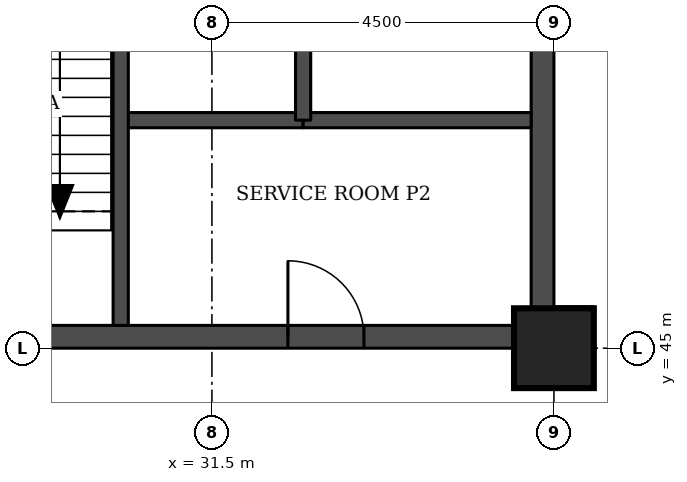
"""IFC4 building model, lengths in metres.
Left out: names, types, materials, properties, quantities, classifications, styles, units other than length and angle.
Written with IfcOpenShell. Run it as: python <this file> out.ifc"""

import sys

from ifc_helpers import new_model, si_unit, direction, frame, frame_2d, origin, origin_2d, place, context, subcontext, project, spatial, rectangle, extrude, element, fill, save


model = new_model("IFC4")
c1 = context("Model", 3, precision=1e-05, world=origin(), true_north=direction((0.0, 1.0)))
c2 = subcontext(c1, "Body", "Model", "MODEL_VIEW")
j1 = project(units=[si_unit("LENGTHUNIT", "METRE"), si_unit("PLANEANGLEUNIT", "RADIAN")], contexts=[c1])
p1 = place(None, origin())
s1 = spatial("IfcSite", under=j1, at=p1, CompositionType="ELEMENT")
p2 = place(p1, origin())
s2 = spatial("IfcBuilding", under=s1, at=p2, CompositionType="ELEMENT")
p3 = place(p2, frame((0.0, 0.0, 127.0)))
s3 = spatial("IfcBuildingStorey", under=s2, at=p3, CompositionType="ELEMENT", Elevation=127.0)
p4 = place(p3, frame((36.0, 45.0, 0.0), z_axis=(0.0, 0.0, 1.0), x_axis=(1.0, 0.0, 0.0)))
e1 = element("IfcColumn", 1, at=p4, inside=s3, PredefinedType="COLUMN", context=c2, shape_type="SweptSolid", body=[
    extrude(rectangle(XDim=1.05, YDim=1.05, at=origin_2d()), origin(), (0.0, 0.0, 1.0), 3.7),
])
p5 = place(p3, frame((27.3, 45.15, 0.0), z_axis=(0.0, 0.0, 1.0), x_axis=(1.0, 0.0, 0.0)))
e2 = element("IfcWall", 2, at=p5, inside=s3, PredefinedType="SHEAR", context=c2, shape_type="SweptSolid", body=[
    extrude(rectangle(XDim=8.4, YDim=0.3, at=frame_2d((4.2, 0.0))), origin(), (0.0, 0.0, 1.0), 3.7),
])
p6 = place(p5, frame((5.2, 0.0, 0.0)))
e3 = element("IfcOpeningElement", 3, at=p6, cuts=e2, PredefinedType="OPENING", context=c2, shape_type="SweptSolid", body=[
    extrude(rectangle(XDim=1.0, YDim=2.1, at=frame_2d((0.5, 1.05))), frame((0.0, 0.16, 0.0), z_axis=(0.0, -1.0, 0.0), x_axis=(1.0, 0.0, 0.0)), (0.0, 0.0, 1.0), 0.32),
])
p7 = place(p3, frame((35.85, 45.0, 0.0), z_axis=(0.0, 0.0, 1.0), x_axis=(0.0, 1.0, 0.0)))
e4 = element("IfcWall", 4, at=p7, inside=s3, PredefinedType="SHEAR", context=c2, shape_type="SweptSolid", body=[
    extrude(rectangle(XDim=9.0, YDim=0.3, at=frame_2d((4.5, 0.0))), origin(), (0.0, 0.0, 1.0), 3.7),
])
p8 = place(p3, frame((30.3, 48.0, 0.0), z_axis=(0.0, 0.0, 1.0), x_axis=(1.0, 0.0, 0.0)))
e5 = element("IfcWall", 5, at=p8, inside=s3, PredefinedType="SOLIDWALL", context=c2, shape_type="SweptSolid", body=[
    extrude(rectangle(XDim=2.4, YDim=0.2, at=frame_2d((1.2, 0.0))), origin(), (0.0, 0.0, 1.0), 3.55),
])
p9 = place(p3, frame((32.7, 48.0, 0.0), z_axis=(0.0, 0.0, 1.0), x_axis=(1.0, 0.0, 0.0)))
e6 = element("IfcWall", 6, at=p9, inside=s3, PredefinedType="SOLIDWALL", context=c2, shape_type="SweptSolid", body=[
    extrude(rectangle(XDim=3.0, YDim=0.2, at=frame_2d((1.5, 0.0))), origin(), (0.0, 0.0, 1.0), 3.55),
])
for number, where, z_axis, x_axis in (
    (7, (30.3, 45.3, 0.0), (0.0, 0.0, 1.0), (0.0, 1.0, 0.0)),
    (8, (32.7, 48.0, 0.0), (0.0, 0.0, 1.0), (0.0, 1.0, 0.0)),
):
    element("IfcWall", number, at=place(p3, frame(where, z_axis=z_axis, x_axis=x_axis)), inside=s3, PredefinedType="SOLIDWALL", context=c2, shape_type="SweptSolid", body=[
        extrude(rectangle(XDim=5.7, YDim=0.2, at=frame_2d((2.85, 0.0))), origin(), (0.0, 0.0, 1.0), 3.55),
    ])
p10 = place(p6, origin())
e9 = element("IfcDoor", 9, at=p10, inside=s3, OperationType="SINGLE_SWING_LEFT", PredefinedType="DOOR", context=c2, shape_type="SweptSolid", body=[
    extrude(rectangle(XDim=1.0, YDim=2.1, at=frame_2d((0.5, 1.05))), frame((0.0, 0.025, 0.0), z_axis=(0.0, -1.0, 0.0), x_axis=(1.0, 0.0, 0.0)), (0.0, 0.0, 1.0), 0.05),
])
fill(e3, e9)
save(model, sys.argv[1])
